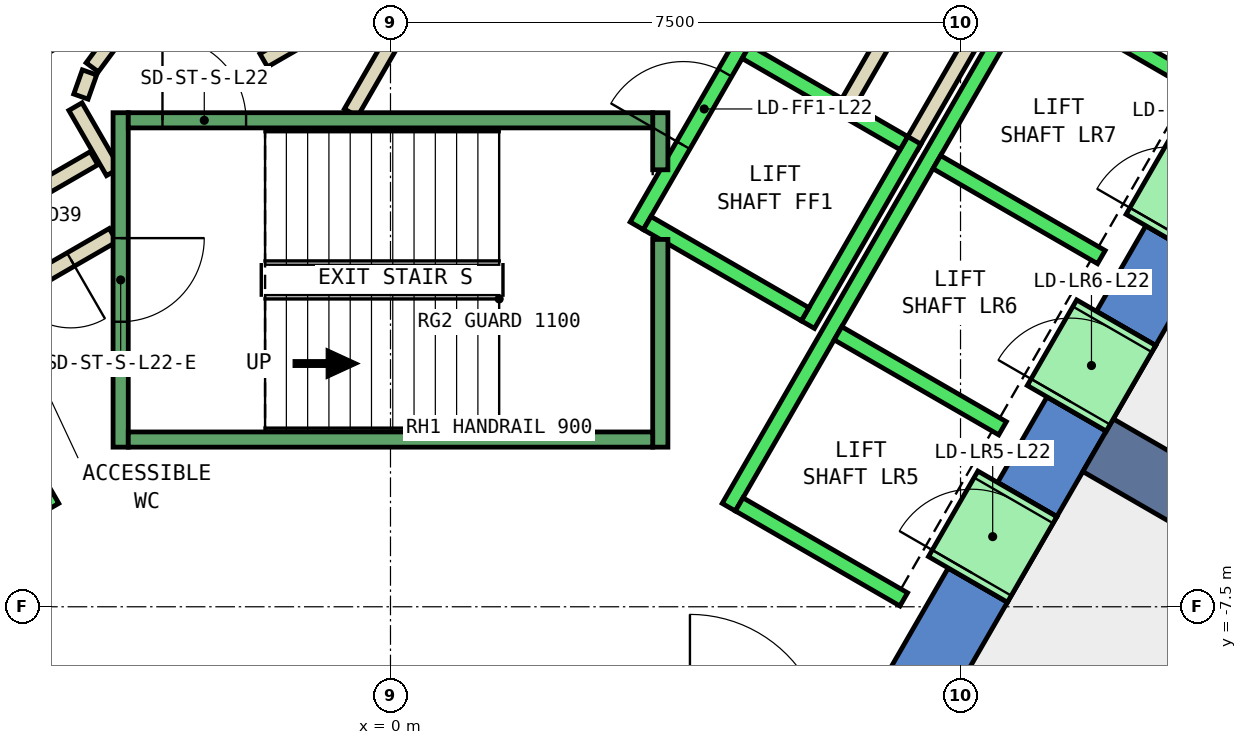
"""IFC4 building model, lengths in metres.
Left out: names, types, materials, properties, quantities, classifications, styles, units other than length and angle.
Written with IfcOpenShell. Run it as: python <this file> out.ifc"""

import sys

from ifc_helpers import new_model, si_unit, direction, frame, frame_2d, origin, place, context, subcontext, project, spatial, polyline, rectangle, outline, extrude, element, fill, save


model = new_model("IFC4")
c1 = context("Model", 3, precision=1e-05, world=origin(), true_north=direction((0.0, 1.0)))
c2 = subcontext(c1, "Body", "Model", "MODEL_VIEW")
j1 = project(units=[si_unit("LENGTHUNIT", "METRE"), si_unit("PLANEANGLEUNIT", "RADIAN")], contexts=[c1])
p1 = place(None, origin())
s1 = spatial("IfcSite", under=j1, at=p1, CompositionType="ELEMENT")
p2 = place(p1, origin())
s2 = spatial("IfcBuilding", under=s1, at=p2, CompositionType="ELEMENT")
p3 = place(p2, frame((0.0, 0.0, 103.4)))
s3 = spatial("IfcBuildingStorey", under=s2, at=p3, CompositionType="ELEMENT", Elevation=103.4)
p4 = place(p3, frame((0.0, 0.0, -0.4)))
e1 = element("IfcWall", 1, at=p4, inside=s3, PredefinedType="SHEAR", context=c2, shape_type="SweptSolid", body=[
    extrude(outline(polyline([(8.117, -7.44), (7.338, -6.99), (6.409, -8.6), (6.928, -9.5), (8.117, -7.44)])), origin(), (0.0, 0.0, 1.0), 4.2),
])
p5 = place(p3, frame((0.0, 0.0, -0.4)))
e2 = element("IfcWall", 2, at=p5, inside=s3, PredefinedType="SHEAR", context=c2, shape_type="SweptSolid", body=[
    extrude(outline(polyline([(9.417, -5.189), (8.638, -4.739), (7.988, -5.864), (8.767, -6.314), (9.417, -5.189)])), origin(), (0.0, 0.0, 1.0), 4.2),
])
p6 = place(p3, frame((0.0, 0.0, -0.4)))
e3 = element("IfcWall", 3, at=p6, inside=s3, PredefinedType="SHEAR", context=c2, shape_type="SweptSolid", body=[
    extrude(outline(polyline([(10.717, -2.937), (9.938, -2.487), (9.288, -3.613), (10.067, -4.063), (10.717, -2.937)])), origin(), (0.0, 0.0, 1.0), 4.2),
])
p7 = place(p3, frame((0.0, 0.0, 3.6)))
e4 = element("IfcWall", 4, at=p7, inside=s3, PredefinedType="SHEAR", context=c2, shape_type="SweptSolid", body=[
    extrude(outline(polyline([(8.767, -6.314), (7.988, -5.864), (7.338, -6.99), (8.117, -7.44), (8.767, -6.314)])), origin(), (0.0, 0.0, 1.0), 0.2),
])
p8 = place(p3, frame((0.0, 0.0, 3.6)))
e5 = element("IfcWall", 5, at=p8, inside=s3, PredefinedType="SHEAR", context=c2, shape_type="SweptSolid", body=[
    extrude(outline(polyline([(10.067, -4.063), (9.288, -3.613), (8.638, -4.739), (9.417, -5.189), (10.067, -4.063)])), origin(), (0.0, 0.0, 1.0), 0.2),
])
p9 = place(p3, frame((0.0, 0.0, 3.6)))
e6 = element("IfcWall", 6, at=p9, inside=s3, PredefinedType="SHEAR", context=c2, shape_type="SweptSolid", body=[
    extrude(outline(polyline([(11.367, -1.811), (10.588, -1.361), (9.938, -2.487), (10.717, -2.937), (11.367, -1.811)])), origin(), (0.0, 0.0, 1.0), 0.2),
])
p10 = place(p3, frame((9.31, -5.375, -0.4), z_axis=(0.0, 0.0, 1.0), x_axis=(0.866017533419, -0.500013631625, 0.0)))
e7 = element("IfcWall", 7, at=p10, inside=s3, PredefinedType="SHEAR", context=c2, shape_type="SweptSolid", body=[
    extrude(rectangle(XDim=9.0, YDim=0.8, at=frame_2d((4.5, 0.0))), origin(), (0.0, 0.0, 1.0), 4.2),
])
p11 = place(p3, frame((6.826, 0.522, 0.0), z_axis=(0.0, 0.0, 1.0), x_axis=(-0.500016722714, -0.866015748706, 0.0)))
e8 = element("IfcWall", 8, at=p11, inside=s3, PredefinedType="PARTITIONING", context=c2, shape_type="SweptSolid", body=[
    extrude(rectangle(XDim=1.7, YDim=0.2, at=frame_2d((0.85, 0.0))), origin(), (0.0, 0.0, 1.0), 3.8),
])
p12 = place(p3, frame((8.192, 0.888, 0.0), z_axis=(0.0, 0.0, 1.0), x_axis=(-0.499940625693, -0.866059680843, 0.0)))
e9 = element("IfcWall", 9, at=p12, inside=s3, PredefinedType="PARTITIONING", context=c2, shape_type="SweptSolid", body=[
    extrude(rectangle(XDim=2.68, YDim=0.2, at=frame_2d((1.34, 0.0))), origin(), (0.0, 0.0, 1.0), 3.8),
])
p13 = place(p3, frame((-3.9, -1.599, 0.0), z_axis=(0.0, 0.0, 1.0), x_axis=(-0.865969445389, -0.500096910261, 0.0)))
e10 = element("IfcWall", 10, at=p13, inside=s3, PredefinedType="PARTITIONING", context=c2, shape_type="SweptSolid", body=[
    extrude(rectangle(XDim=1.373, YDim=0.2, at=frame_2d((0.687, 0.0))), origin(), (0.0, 0.0, 1.0), 3.8),
])
p14 = place(p3, frame((-3.65, -2.61, 0.0), z_axis=(0.0, 0.0, 1.0), x_axis=(-0.866072462134, -0.499918483688, 0.0)))
e11 = element("IfcWall", 11, at=p14, inside=s3, PredefinedType="PARTITIONING", context=c2, shape_type="SweptSolid", body=[
    extrude(rectangle(XDim=2.084, YDim=0.2, at=frame_2d((1.042, 0.0))), origin(), (0.0, 0.0, 1.0), 3.8),
])
p15 = place(p14, frame((0.642, 0.0, 0.0)))
e12 = element("IfcOpeningElement", 12, at=p15, cuts=e11, PredefinedType="OPENING", context=c2, shape_type="SweptSolid", body=[
    extrude(rectangle(XDim=0.9, YDim=2.1, at=frame_2d((0.45, 1.05))), frame((0.0, 0.11, 0.0), z_axis=(0.0, -1.0, 0.0), x_axis=(1.0, 0.0, 0.0)), (0.0, 0.0, 1.0), 0.22),
])
p16 = place(p3, frame((-4.145, -0.92, 0.0), z_axis=(0.0, 0.0, 1.0), x_axis=(0.499743786207, -0.866173278362, 0.0)))
e13 = element("IfcWall", 13, at=p16, inside=s3, PredefinedType="PARTITIONING", context=c2, shape_type="SweptSolid", body=[
    extrude(rectangle(XDim=0.991, YDim=0.2, at=frame_2d((0.495, 0.0))), origin(), (0.0, 0.0, 1.0), 3.8),
])
p17 = place(p3, frame((-0.52, -1.0, 0.0), z_axis=(0.0, 0.0, 1.0), x_axis=(0.50011622646, 0.865958290007, 0.0)))
e14 = element("IfcWall", 14, at=p17, inside=s3, PredefinedType="PARTITIONING", context=c2, shape_type="SweptSolid", body=[
    extrude(rectangle(XDim=4.991, YDim=0.2, at=frame_2d((2.496, 0.0))), origin(), (0.0, 0.0, 1.0), 3.8),
])
p18 = place(p17, frame((1.945, 0.0, 0.0)))
e15 = element("IfcOpeningElement", 15, at=p18, cuts=e14, PredefinedType="OPENING", context=c2, shape_type="SweptSolid", body=[
    extrude(rectangle(XDim=1.0, YDim=2.1, at=frame_2d((0.5, 1.05))), frame((0.0, 0.11, 0.0), z_axis=(0.0, -1.0, 0.0), x_axis=(1.0, 0.0, 0.0)), (0.0, 0.0, 1.0), 0.22),
])
p19 = place(p3, frame((-0.412, 0.414, 0.0), z_axis=(0.0, 0.0, 1.0), x_axis=(-0.866017369001, -0.500013916395, 0.0)))
e16 = element("IfcWall", 16, at=p19, inside=s3, PredefinedType="PARTITIONING", context=c2, shape_type="SweptSolid", body=[
    extrude(rectangle(XDim=1.45, YDim=0.2, at=frame_2d((0.725, 0.0))), origin(), (0.0, 0.0, 1.0), 3.8),
])
p20 = place(p3, frame((-3.723, -0.131, 0.0), z_axis=(0.0, 0.0, 1.0), x_axis=(-0.594675113454, -0.803966112121, 0.0)))
e17 = element("IfcWall", 17, at=p20, inside=s3, PredefinedType="PARTITIONING", context=c2, shape_type="SweptSolid", body=[
    extrude(rectangle(XDim=0.338, YDim=0.2, at=frame_2d((0.169, 0.0))), origin(), (0.0, 0.0, 1.0), 3.8),
])
p21 = place(p3, frame((-3.96, -0.47, 0.0), z_axis=(0.0, 0.0, 1.0), x_axis=(-0.334824194261, -0.942280615813, 0.0)))
e18 = element("IfcWall", 18, at=p21, inside=s3, PredefinedType="PARTITIONING", context=c2, shape_type="SweptSolid", body=[
    extrude(rectangle(XDim=0.338, YDim=0.2, at=frame_2d((0.169, 0.0))), origin(), (0.0, 0.0, 1.0), 3.8),
])
p22 = place(p3, frame((12.401, -7.621, 0.0), z_axis=(0.0, 0.0, 1.0), x_axis=(-0.499983724212, -0.866034800411, 0.0)))
e19 = element("IfcWall", 19, at=p22, inside=s3, PredefinedType="PARTITIONING", context=c2, shape_type="SweptSolid", body=[
    extrude(rectangle(XDim=9.302, YDim=0.2, at=frame_2d((4.651, 0.0))), origin(), (0.0, 0.0, 1.0), 3.8),
])
p23 = place(p3, frame((-9.751, 2.99, 0.0), z_axis=(0.0, 0.0, 1.0), x_axis=(0.50000090737, -0.866024879913, 0.0)))
e20 = element("IfcWall", 20, at=p23, inside=s3, PredefinedType="STANDARD", context=c2, shape_type="SweptSolid", body=[
    extrude(rectangle(XDim=10.6, YDim=0.2, at=frame_2d((5.3, 0.0))), origin(), (0.0, 0.0, 1.0), 3.8),
])
p24 = place(p3, frame((3.24, -2.488, 0.0), z_axis=(0.0, 0.0, 1.0), x_axis=(0.49994636267, 0.866056369097, 0.0)))
e21 = element("IfcWall", 21, at=p24, inside=s3, PredefinedType="STANDARD", context=c2, shape_type="SweptSolid", body=[
    extrude(rectangle(XDim=2.8, YDim=0.2, at=frame_2d((1.4, 0.0))), origin(), (0.0, 0.0, 1.0), 3.8),
])
p25 = place(p24, frame((1.225, 0.0, 0.0)))
e22 = element("IfcOpeningElement", 22, at=p25, cuts=e21, PredefinedType="OPENING", context=c2, shape_type="SweptSolid", body=[
    extrude(rectangle(XDim=1.1, YDim=2.1, at=frame_2d((0.55, 1.05))), frame((0.0, 0.11, 0.0), z_axis=(0.0, -1.0, 0.0), x_axis=(1.0, 0.0, 0.0)), (0.0, 0.0, 1.0), 0.22),
])
p26 = place(p3, frame((5.492, -3.788, 0.0), z_axis=(0.0, 0.0, 1.0), x_axis=(0.500011755427, 0.866018616679, 0.0)))
e23 = element("IfcWall", 23, at=p26, inside=s3, PredefinedType="STANDARD", context=c2, shape_type="SweptSolid", body=[
    extrude(rectangle(XDim=2.8, YDim=0.2, at=frame_2d((1.4, 0.0))), origin(), (0.0, 0.0, 1.0), 3.8),
])
p27 = place(p3, frame((3.377, -2.452, 0.0), z_axis=(0.0, 0.0, 1.0), x_axis=(0.865955154139, -0.50012165622, 0.0)))
e24 = element("IfcWall", 24, at=p27, inside=s3, PredefinedType="STANDARD", context=c2, shape_type="SweptSolid", body=[
    extrude(rectangle(XDim=2.4, YDim=0.2, at=frame_2d((1.2, 0.0))), origin(), (0.0, 0.0, 1.0), 3.8),
])
p28 = place(p3, frame((4.677, -0.2, 0.0), z_axis=(0.0, 0.0, 1.0), x_axis=(0.865973769406, -0.500089422704, 0.0)))
e25 = element("IfcWall", 25, at=p28, inside=s3, PredefinedType="STANDARD", context=c2, shape_type="SweptSolid", body=[
    extrude(rectangle(XDim=2.399, YDim=0.2, at=frame_2d((1.2, 0.0))), origin(), (0.0, 0.0, 1.0), 3.8),
])
p29 = place(p3, frame((4.451, -6.19, 0.0), z_axis=(0.0, 0.0, 1.0), x_axis=(0.50000090737, 0.866024879913, 0.0)))
e26 = element("IfcWall", 26, at=p29, inside=s3, PredefinedType="STANDARD", context=c2, shape_type="SweptSolid", body=[
    extrude(rectangle(XDim=10.6, YDim=0.2, at=frame_2d((5.3, 0.0))), origin(), (0.0, 0.0, 1.0), 3.8),
])
for number, where, z_axis, x_axis in (
    (27, (4.588, -6.153, 0.0), (0.0, 0.0, 1.0), (0.866, -0.5, 0.0)),
    (28, (5.888, -3.902, 0.0), (0.0, 0.0, 1.0), (0.866, -0.5, 0.0)),
    (29, (7.188, -1.65, 0.0), (0.0, 0.0, 1.0), (0.866, -0.5, 0.0)),
    (30, (8.488, 0.602, 0.0), (0.0, 0.0, 1.0), (0.866, -0.5, 0.0)),
):
    element("IfcWall", number, at=place(p3, frame(where, z_axis=z_axis, x_axis=x_axis)), inside=s3, PredefinedType="STANDARD", context=c2, shape_type="SweptSolid", body=[
        extrude(rectangle(XDim=2.5, YDim=0.2, at=frame_2d((1.25, 0.0))), origin(), (0.0, 0.0, 1.0), 3.8),
    ])
p30 = place(p3, frame((7.598, -7.14, 0.0), z_axis=(0.0, 0.0, 1.0), x_axis=(0.500362116554, 0.865816234728, 0.0)))
e31 = element("IfcWall", 31, at=p30, inside=s3, PredefinedType="STANDARD", context=c2, shape_type="SweptSolid", body=[
    extrude(rectangle(XDim=1.299, YDim=1.2, at=frame_2d((0.65, 0.0))), origin(), (0.0, 0.0, 1.0), 2.4),
])
p31 = place(p30, frame((0.1, 0.0, 0.0)))
e32 = element("IfcOpeningElement", 32, at=p31, cuts=e31, PredefinedType="OPENING", context=c2, shape_type="SweptSolid", body=[
    extrude(rectangle(XDim=1.1, YDim=2.3, at=frame_2d((0.55, 1.15))), frame((0.0, 0.61, 0.0), z_axis=(0.0, -1.0, 0.0), x_axis=(1.0, 0.0, 0.0)), (0.0, 0.0, 1.0), 1.22),
])
p32 = place(p3, frame((8.898, -4.889, 0.0), z_axis=(0.0, 0.0, 1.0), x_axis=(0.500036693733, 0.866004217611, 0.0)))
e33 = element("IfcWall", 33, at=p32, inside=s3, PredefinedType="STANDARD", context=c2, shape_type="SweptSolid", body=[
    extrude(rectangle(XDim=1.3, YDim=1.2, at=frame_2d((0.65, 0.0))), origin(), (0.0, 0.0, 1.0), 2.4),
])
p33 = place(p32, frame((0.1, 0.0, 0.0)))
e34 = element("IfcOpeningElement", 34, at=p33, cuts=e33, PredefinedType="OPENING", context=c2, shape_type="SweptSolid", body=[
    extrude(rectangle(XDim=1.1, YDim=2.3, at=frame_2d((0.55, 1.15))), frame((0.0, 0.61, 0.0), z_axis=(0.0, -1.0, 0.0), x_axis=(1.0, 0.0, 0.0)), (0.0, 0.0, 1.0), 1.22),
])
p34 = place(p3, frame((10.198, -2.637, 0.0), z_axis=(0.0, 0.0, 1.0), x_axis=(0.49989585183, 0.866085525409, 0.0)))
e35 = element("IfcWall", 35, at=p34, inside=s3, PredefinedType="STANDARD", context=c2, shape_type="SweptSolid", body=[
    extrude(rectangle(XDim=1.3, YDim=1.2, at=frame_2d((0.65, 0.0))), origin(), (0.0, 0.0, 1.0), 2.4),
])
p35 = place(p34, frame((0.1, 0.0, 0.0)))
e36 = element("IfcOpeningElement", 36, at=p35, cuts=e35, PredefinedType="OPENING", context=c2, shape_type="SweptSolid", body=[
    extrude(rectangle(XDim=1.1, YDim=2.3, at=frame_2d((0.55, 1.15))), frame((0.0, 0.61, 0.0), z_axis=(0.0, -1.0, 0.0), x_axis=(1.0, 0.0, 0.0)), (0.0, 0.0, 1.0), 1.22),
])
p36 = place(p3, frame((-3.55, -1.0, 0.0), z_axis=(0.0, 0.0, 1.0), x_axis=(0.0, -1.0, 0.0)))
e37 = element("IfcWall", 37, at=p36, inside=s3, PredefinedType="STANDARD", context=c2, shape_type="SweptSolid", body=[
    extrude(rectangle(XDim=4.4, YDim=0.2, at=frame_2d((2.2, 0.0))), origin(), (0.0, 0.0, 1.0), 3.8),
])
p37 = place(p36, frame((1.65, 0.0, 0.0)))
e38 = element("IfcOpeningElement", 38, at=p37, cuts=e37, PredefinedType="OPENING", context=c2, shape_type="SweptSolid", body=[
    extrude(rectangle(XDim=1.1, YDim=2.2, at=frame_2d((0.55, 1.1))), frame((0.0, 0.11, 0.0), z_axis=(0.0, -1.0, 0.0), x_axis=(1.0, 0.0, 0.0)), (0.0, 0.0, 1.0), 0.22),
])
p38 = place(p3, frame((3.55, -2.667, 0.0), z_axis=(0.0, 0.0, 1.0), x_axis=(0.0, -1.0, 0.0)))
e39 = element("IfcWall", 39, at=p38, inside=s3, PredefinedType="STANDARD", context=c2, shape_type="SweptSolid", body=[
    extrude(rectangle(XDim=2.733, YDim=0.2, at=frame_2d((1.366, 0.0))), origin(), (0.0, 0.0, 1.0), 3.8),
])
p39 = place(p3, frame((3.55, -1.0, 0.0), z_axis=(0.0, 0.0, 1.0), x_axis=(0.0, -1.0, 0.0)))
e40 = element("IfcWall", 40, at=p39, inside=s3, PredefinedType="STANDARD", context=c2, shape_type="SweptSolid", body=[
    extrude(rectangle(XDim=0.751, YDim=0.2, at=frame_2d((0.375, 0.0))), origin(), (0.0, 0.0, 1.0), 3.8),
])
p40 = place(p3, frame((-3.45, -1.1, 0.0), z_axis=(0.0, 0.0, 1.0), x_axis=(1.0, 0.0, 0.0)))
e41 = element("IfcWall", 41, at=p40, inside=s3, PredefinedType="STANDARD", context=c2, shape_type="SweptSolid", body=[
    extrude(rectangle(XDim=6.9, YDim=0.2, at=frame_2d((3.45, 0.0))), origin(), (0.0, 0.0, 1.0), 3.8),
])
p41 = place(p40, frame((0.45, 0.0, 0.0)))
e42 = element("IfcOpeningElement", 42, at=p41, cuts=e41, PredefinedType="OPENING", context=c2, shape_type="SweptSolid", body=[
    extrude(rectangle(XDim=1.1, YDim=2.2, at=frame_2d((0.55, 1.1))), frame((0.0, 0.11, 0.0), z_axis=(0.0, -1.0, 0.0), x_axis=(1.0, 0.0, 0.0)), (0.0, 0.0, 1.0), 0.22),
])
p42 = place(p3, frame((-3.45, -5.3, 0.0), z_axis=(0.0, 0.0, 1.0), x_axis=(1.0, 0.0, 0.0)))
e43 = element("IfcWall", 43, at=p42, inside=s3, PredefinedType="STANDARD", context=c2, shape_type="SweptSolid", body=[
    extrude(rectangle(XDim=6.9, YDim=0.2, at=frame_2d((3.45, 0.0))), origin(), (0.0, 0.0, 1.0), 3.8),
])
p43 = place(p15, origin())
e44 = element("IfcDoor", 44, at=p43, inside=s3, OperationType="SINGLE_SWING_LEFT", PredefinedType="DOOR", context=c2, shape_type="SweptSolid", body=[
    extrude(rectangle(XDim=0.9, YDim=2.1, at=frame_2d((0.45, 1.05))), frame((0.0, 0.025, 0.0), z_axis=(0.0, -1.0, 0.0), x_axis=(1.0, 0.0, 0.0)), (0.0, 0.0, 1.0), 0.05),
])
fill(e12, e44)
p44 = place(p31, origin())
e45 = element("IfcDoor", 45, at=p44, inside=s3, OperationType="SLIDING_TO_LEFT", PredefinedType="DOOR", context=c2, shape_type="SweptSolid", body=[
    extrude(rectangle(XDim=1.1, YDim=2.3, at=frame_2d((0.55, 1.15))), frame((0.0, 0.025, 0.0), z_axis=(0.0, -1.0, 0.0), x_axis=(1.0, 0.0, 0.0)), (0.0, 0.0, 1.0), 0.05),
])
fill(e32, e45)
p45 = place(p33, origin())
e46 = element("IfcDoor", 46, at=p45, inside=s3, OperationType="SLIDING_TO_LEFT", PredefinedType="DOOR", context=c2, shape_type="SweptSolid", body=[
    extrude(rectangle(XDim=1.1, YDim=2.3, at=frame_2d((0.55, 1.15))), frame((0.0, 0.025, 0.0), z_axis=(0.0, -1.0, 0.0), x_axis=(1.0, 0.0, 0.0)), (0.0, 0.0, 1.0), 0.05),
])
fill(e34, e46)
p46 = place(p25, origin())
e47 = element("IfcDoor", 47, at=p46, inside=s3, OperationType="SLIDING_TO_LEFT", PredefinedType="DOOR", context=c2, shape_type="SweptSolid", body=[
    extrude(rectangle(XDim=1.1, YDim=2.1, at=frame_2d((0.55, 1.05))), frame((0.0, 0.025, 0.0), z_axis=(0.0, -1.0, 0.0), x_axis=(1.0, 0.0, 0.0)), (0.0, 0.0, 1.0), 0.05),
])
fill(e22, e47)
p47 = place(p41, origin())
e48 = element("IfcDoor", 48, at=p47, inside=s3, OperationType="SINGLE_SWING_LEFT", PredefinedType="DOOR", context=c2, shape_type="SweptSolid", body=[
    extrude(rectangle(XDim=1.1, YDim=2.2, at=frame_2d((0.55, 1.1))), frame((0.0, 0.025, 0.0), z_axis=(0.0, -1.0, 0.0), x_axis=(1.0, 0.0, 0.0)), (0.0, 0.0, 1.0), 0.05),
])
fill(e42, e48)
p48 = place(p37, origin())
e49 = element("IfcDoor", 49, at=p48, inside=s3, OperationType="SINGLE_SWING_LEFT", PredefinedType="DOOR", context=c2, shape_type="SweptSolid", body=[
    extrude(rectangle(XDim=1.1, YDim=2.2, at=frame_2d((0.55, 1.1))), frame((0.0, 0.025, 0.0), z_axis=(0.0, -1.0, 0.0), x_axis=(1.0, 0.0, 0.0)), (0.0, 0.0, 1.0), 0.05),
])
fill(e38, e49)
save(model, sys.argv[1])
